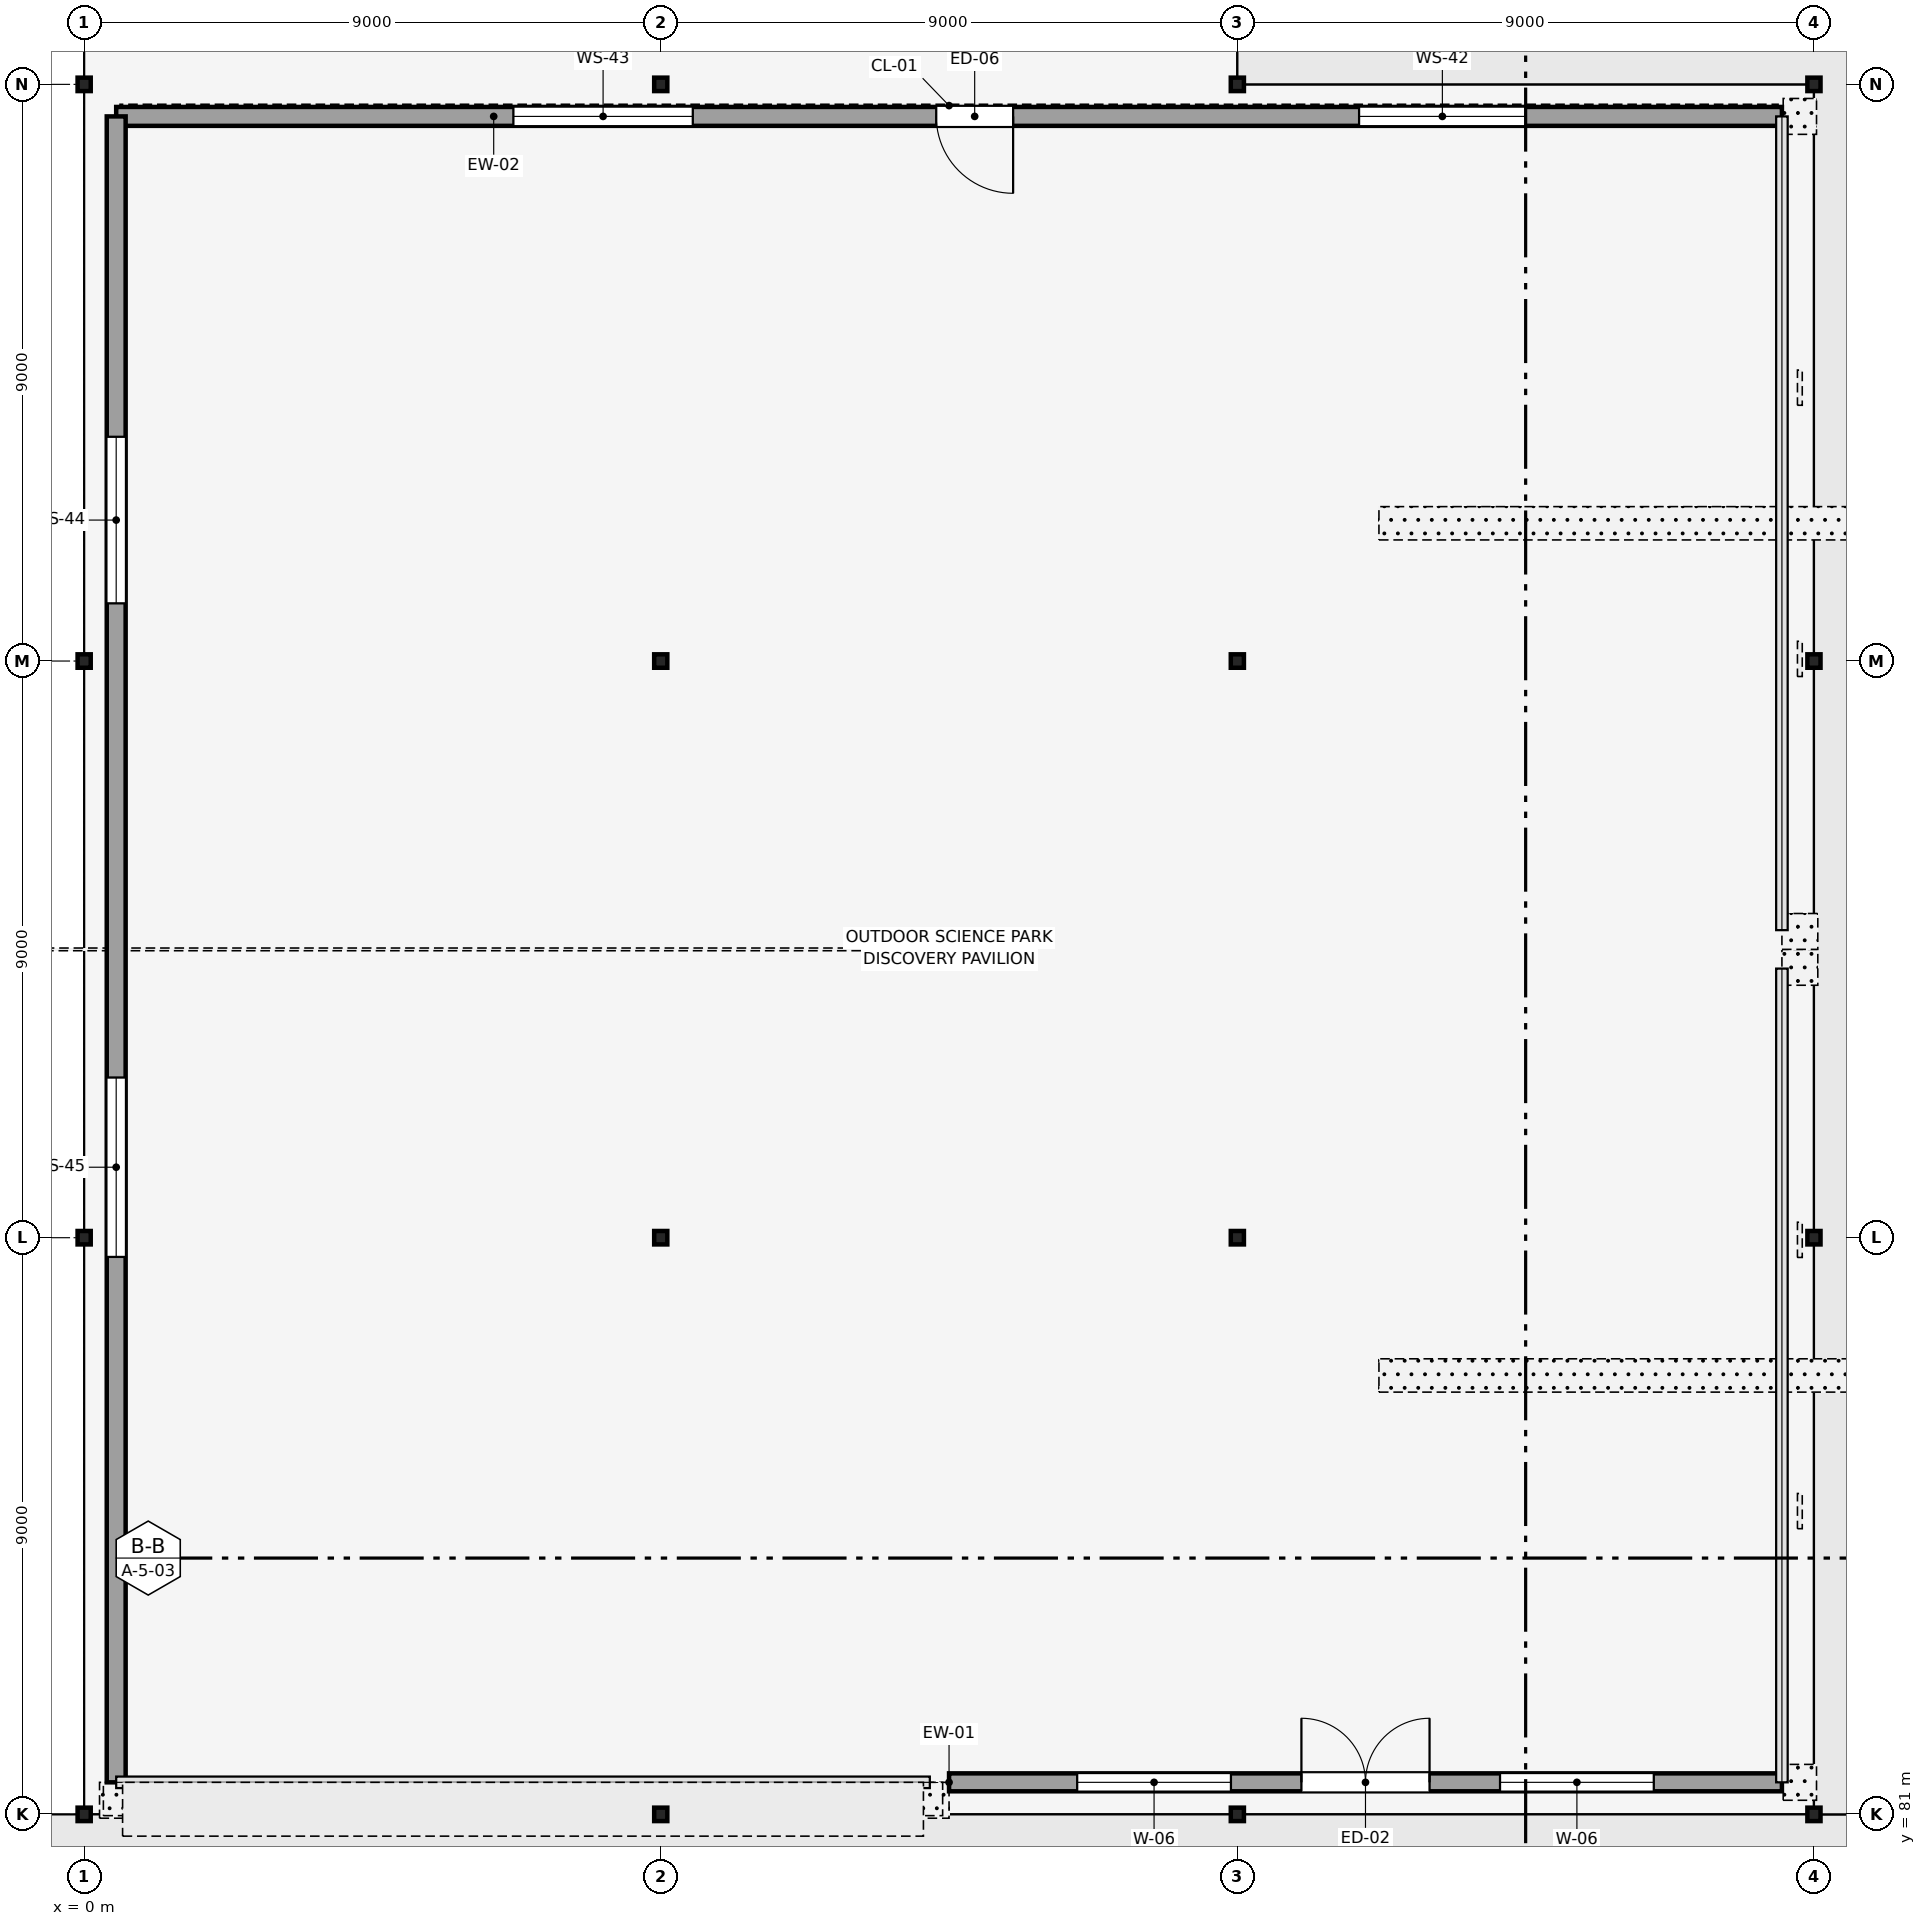
"""IFC4 building model, lengths in metres.
Left out: names, types, materials, properties, quantities, classifications, styles, units other than length and angle.
Written with IfcOpenShell. Run it as: python <this file> out.ifc"""

import sys

from ifc_helpers import new_model, si_unit, direction, frame, frame_2d, origin, origin_2d, place, context, subcontext, project, spatial, rectangle, i_section, extrude, element, fill, save


model = new_model("IFC4")
c1 = context("Model", 3, precision=1e-05, world=origin(), true_north=direction((0.0, 1.0)))
c2 = subcontext(c1, "Body", "Model", "MODEL_VIEW")
j1 = project(units=[si_unit("LENGTHUNIT", "METRE"), si_unit("PLANEANGLEUNIT", "RADIAN")], contexts=[c1])
p1 = place(None, origin())
s1 = spatial("IfcSite", under=j1, at=p1, CompositionType="ELEMENT")
p2 = place(p1, origin())
s2 = spatial("IfcBuilding", under=s1, at=p2, CompositionType="ELEMENT")
p3 = place(p2, origin())
s3 = spatial("IfcBuildingStorey", under=s2, at=p3, CompositionType="ELEMENT", Elevation=0.0)
for number, where, z_axis, x_axis in (
    (1, (0.0, 81.0, -0.26), (0.0, 0.0, 1.0), (1.0, 0.0, 0.0)),
    (2, (0.0, 90.0, -0.26), (0.0, 0.0, 1.0), (1.0, 0.0, 0.0)),
    (3, (0.0, 99.0, -0.26), (0.0, 0.0, 1.0), (1.0, 0.0, 0.0)),
    (4, (0.0, 108.0, -0.26), (0.0, 0.0, 1.0), (1.0, 0.0, 0.0)),
    (5, (9.0, 81.0, -0.26), (0.0, 0.0, 1.0), (1.0, 0.0, 0.0)),
    (6, (9.0, 90.0, -0.26), (0.0, 0.0, 1.0), (1.0, 0.0, 0.0)),
    (7, (9.0, 99.0, -0.26), (0.0, 0.0, 1.0), (1.0, 0.0, 0.0)),
    (8, (9.0, 108.0, -0.26), (0.0, 0.0, 1.0), (1.0, 0.0, 0.0)),
    (9, (18.0, 81.0, -0.26), (0.0, 0.0, 1.0), (1.0, 0.0, 0.0)),
    (10, (18.0, 90.0, -0.26), (0.0, 0.0, 1.0), (1.0, 0.0, 0.0)),
    (11, (18.0, 99.0, -0.26), (0.0, 0.0, 1.0), (1.0, 0.0, 0.0)),
    (12, (18.0, 108.0, -0.26), (0.0, 0.0, 1.0), (1.0, 0.0, 0.0)),
    (13, (27.0, 81.0, -0.26), (0.0, 0.0, 1.0), (1.0, 0.0, 0.0)),
    (14, (27.0, 90.0, -0.26), (0.0, 0.0, 1.0), (1.0, 0.0, 0.0)),
    (15, (27.0, 99.0, -0.26), (0.0, 0.0, 1.0), (1.0, 0.0, 0.0)),
    (16, (27.0, 108.0, -0.26), (0.0, 0.0, 1.0), (1.0, 0.0, 0.0)),
):
    element("IfcColumn", number, at=place(p3, frame(where, z_axis=z_axis, x_axis=x_axis)), inside=s3, PredefinedType="COLUMN", context=c2, shape_type="SweptSolid", body=[
        extrude(i_section(OverallWidth=0.205, OverallDepth=0.21, WebThickness=0.009, FlangeThickness=0.014, FilletRadius=0.011, at=origin_2d()), origin(), (0.0, 0.0, 1.0), 5.66),
    ])
p4 = place(p3, frame((13.5, 81.5, 0.0), z_axis=(0.0, 0.0, 1.0), x_axis=(1.0, 0.0, 0.0)))
e17 = element("IfcWall", 17, at=p4, inside=s3, PredefinedType="STANDARD", context=c2, shape_type="SweptSolid", body=[
    extrude(rectangle(XDim=13.0, YDim=0.28, at=frame_2d((6.5, 0.0))), origin(), (0.0, 0.0, 1.0), 4.8),
])
p5 = place(p4, frame((2.0, 0.0, 0.8)))
e18 = element("IfcOpeningElement", 18, at=p5, cuts=e17, PredefinedType="OPENING", context=c2, shape_type="SweptSolid", body=[
    extrude(rectangle(XDim=2.4, YDim=2.1, at=frame_2d((1.2, 1.05))), frame((0.0, 0.15, 0.0), z_axis=(0.0, -1.0, 0.0), x_axis=(1.0, 0.0, 0.0)), (0.0, 0.0, 1.0), 0.3),
])
p6 = place(p4, frame((8.6, 0.0, 0.8)))
e19 = element("IfcOpeningElement", 19, at=p6, cuts=e17, PredefinedType="OPENING", context=c2, shape_type="SweptSolid", body=[
    extrude(rectangle(XDim=2.4, YDim=2.1, at=frame_2d((1.2, 1.05))), frame((0.0, 0.15, 0.0), z_axis=(0.0, -1.0, 0.0), x_axis=(1.0, 0.0, 0.0)), (0.0, 0.0, 1.0), 0.3),
])
p7 = place(p4, frame((5.5, 0.0, 0.0)))
e20 = element("IfcOpeningElement", 20, at=p7, cuts=e17, PredefinedType="OPENING", context=c2, shape_type="SweptSolid", body=[
    extrude(rectangle(XDim=2.0, YDim=2.5, at=frame_2d((1.0, 1.25))), frame((0.0, 0.15, 0.0), z_axis=(0.0, -1.0, 0.0), x_axis=(1.0, 0.0, 0.0)), (0.0, 0.0, 1.0), 0.3),
])
p8 = place(p3, frame((26.5, 107.5, 0.0), z_axis=(0.0, 0.0, 1.0), x_axis=(-1.0, 0.0, 0.0)))
e21 = element("IfcWall", 21, at=p8, inside=s3, PredefinedType="STANDARD", context=c2, shape_type="SweptSolid", body=[
    extrude(rectangle(XDim=26.0, YDim=0.295, at=frame_2d((13.0, 0.0))), origin(), (0.0, 0.0, 1.0), 4.8),
])
p9 = place(p8, frame((12.0, 0.0, 0.0)))
e22 = element("IfcOpeningElement", 22, at=p9, cuts=e21, PredefinedType="OPENING", context=c2, shape_type="SweptSolid", body=[
    extrude(rectangle(XDim=1.2, YDim=2.2, at=frame_2d((0.6, 1.1))), frame((0.0, 0.157, 0.0), z_axis=(0.0, -1.0, 0.0), x_axis=(1.0, 0.0, 0.0)), (0.0, 0.0, 1.0), 0.315),
])
p10 = place(p8, frame((4.0, 0.0, 1.1)))
e23 = element("IfcOpeningElement", 23, at=p10, cuts=e21, PredefinedType="OPENING", context=c2, shape_type="SweptSolid", body=[
    extrude(rectangle(XDim=2.6, YDim=1.8, at=frame_2d((1.3, 0.9))), frame((0.0, 0.157, 0.0), z_axis=(0.0, -1.0, 0.0), x_axis=(1.0, 0.0, 0.0)), (0.0, 0.0, 1.0), 0.315),
])
p11 = place(p8, frame((17.0, 0.0, 1.1)))
e24 = element("IfcOpeningElement", 24, at=p11, cuts=e21, PredefinedType="OPENING", context=c2, shape_type="SweptSolid", body=[
    extrude(rectangle(XDim=2.8, YDim=1.8, at=frame_2d((1.4, 0.9))), frame((0.0, 0.157, 0.0), z_axis=(0.0, -1.0, 0.0), x_axis=(1.0, 0.0, 0.0)), (0.0, 0.0, 1.0), 0.315),
])
p12 = place(p3, frame((0.5, 107.5, 0.0), z_axis=(0.0, 0.0, 1.0), x_axis=(0.0, -1.0, 0.0)))
e25 = element("IfcWall", 25, at=p12, inside=s3, PredefinedType="STANDARD", context=c2, shape_type="SweptSolid", body=[
    extrude(rectangle(XDim=26.0, YDim=0.295, at=frame_2d((13.0, 0.0))), origin(), (0.0, 0.0, 1.0), 4.8),
])
p13 = place(p12, frame((5.0, 0.0, 1.1)))
e26 = element("IfcOpeningElement", 26, at=p13, cuts=e25, PredefinedType="OPENING", context=c2, shape_type="SweptSolid", body=[
    extrude(rectangle(XDim=2.6, YDim=1.95, at=frame_2d((1.3, 0.975))), frame((0.0, 0.157, 0.0), z_axis=(0.0, -1.0, 0.0), x_axis=(1.0, 0.0, 0.0)), (0.0, 0.0, 1.0), 0.315),
])
p14 = place(p12, frame((15.0, 0.0, 1.1)))
e27 = element("IfcOpeningElement", 27, at=p14, cuts=e25, PredefinedType="OPENING", context=c2, shape_type="SweptSolid", body=[
    extrude(rectangle(XDim=2.8, YDim=1.95, at=frame_2d((1.4, 0.975))), frame((0.0, 0.157, 0.0), z_axis=(0.0, -1.0, 0.0), x_axis=(1.0, 0.0, 0.0)), (0.0, 0.0, 1.0), 0.315),
])
p15 = place(p5, origin())
e28 = element("IfcWindow", 28, at=p15, inside=s3, PartitioningType="SINGLE_PANEL", PredefinedType="WINDOW", context=c2, shape_type="SweptSolid", body=[
    extrude(rectangle(XDim=2.4, YDim=2.1, at=frame_2d((1.2, 1.05))), frame((0.0, 0.03, 0.0), z_axis=(0.0, -1.0, 0.0), x_axis=(1.0, 0.0, 0.0)), (0.0, 0.0, 1.0), 0.06),
])
fill(e18, e28)
p16 = place(p6, origin())
e29 = element("IfcWindow", 29, at=p16, inside=s3, PartitioningType="SINGLE_PANEL", PredefinedType="WINDOW", context=c2, shape_type="SweptSolid", body=[
    extrude(rectangle(XDim=2.4, YDim=2.1, at=frame_2d((1.2, 1.05))), frame((0.0, 0.03, 0.0), z_axis=(0.0, -1.0, 0.0), x_axis=(1.0, 0.0, 0.0)), (0.0, 0.0, 1.0), 0.06),
])
fill(e19, e29)
p17 = place(p7, origin())
e30 = element("IfcDoor", 30, at=p17, inside=s3, OperationType="DOUBLE_DOOR_SINGLE_SWING", PredefinedType="DOOR", context=c2, shape_type="SweptSolid", body=[
    extrude(rectangle(XDim=2.0, YDim=2.5, at=frame_2d((1.0, 1.25))), frame((0.0, 0.025, 0.0), z_axis=(0.0, -1.0, 0.0), x_axis=(1.0, 0.0, 0.0)), (0.0, 0.0, 1.0), 0.05),
])
fill(e20, e30)
p18 = place(p9, origin())
e31 = element("IfcDoor", 31, at=p18, inside=s3, OperationType="SINGLE_SWING_LEFT", PredefinedType="DOOR", context=c2, shape_type="SweptSolid", body=[
    extrude(rectangle(XDim=1.2, YDim=2.2, at=frame_2d((0.6, 1.1))), frame((0.0, 0.025, 0.0), z_axis=(0.0, -1.0, 0.0), x_axis=(1.0, 0.0, 0.0)), (0.0, 0.0, 1.0), 0.05),
])
fill(e22, e31)
p19 = place(p10, origin())
e32 = element("IfcWindow", 32, at=p19, inside=s3, PartitioningType="SINGLE_PANEL", PredefinedType="WINDOW", context=c2, shape_type="SweptSolid", body=[
    extrude(rectangle(XDim=2.6, YDim=1.8, at=frame_2d((1.3, 0.9))), frame((0.0, 0.03, 0.0), z_axis=(0.0, -1.0, 0.0), x_axis=(1.0, 0.0, 0.0)), (0.0, 0.0, 1.0), 0.06),
])
fill(e23, e32)
p20 = place(p11, origin())
e33 = element("IfcWindow", 33, at=p20, inside=s3, PartitioningType="SINGLE_PANEL", PredefinedType="WINDOW", context=c2, shape_type="SweptSolid", body=[
    extrude(rectangle(XDim=2.8, YDim=1.8, at=frame_2d((1.4, 0.9))), frame((0.0, 0.03, 0.0), z_axis=(0.0, -1.0, 0.0), x_axis=(1.0, 0.0, 0.0)), (0.0, 0.0, 1.0), 0.06),
])
fill(e24, e33)
p21 = place(p13, origin())
e34 = element("IfcWindow", 34, at=p21, inside=s3, PartitioningType="SINGLE_PANEL", PredefinedType="WINDOW", context=c2, shape_type="SweptSolid", body=[
    extrude(rectangle(XDim=2.6, YDim=1.95, at=frame_2d((1.3, 0.975))), frame((0.0, 0.03, 0.0), z_axis=(0.0, -1.0, 0.0), x_axis=(1.0, 0.0, 0.0)), (0.0, 0.0, 1.0), 0.06),
])
fill(e26, e34)
p22 = place(p14, origin())
e35 = element("IfcWindow", 35, at=p22, inside=s3, PartitioningType="SINGLE_PANEL", PredefinedType="WINDOW", context=c2, shape_type="SweptSolid", body=[
    extrude(rectangle(XDim=2.8, YDim=1.95, at=frame_2d((1.4, 0.975))), frame((0.0, 0.03, 0.0), z_axis=(0.0, -1.0, 0.0), x_axis=(1.0, 0.0, 0.0)), (0.0, 0.0, 1.0), 0.06),
])
fill(e27, e35)
save(model, sys.argv[1])
